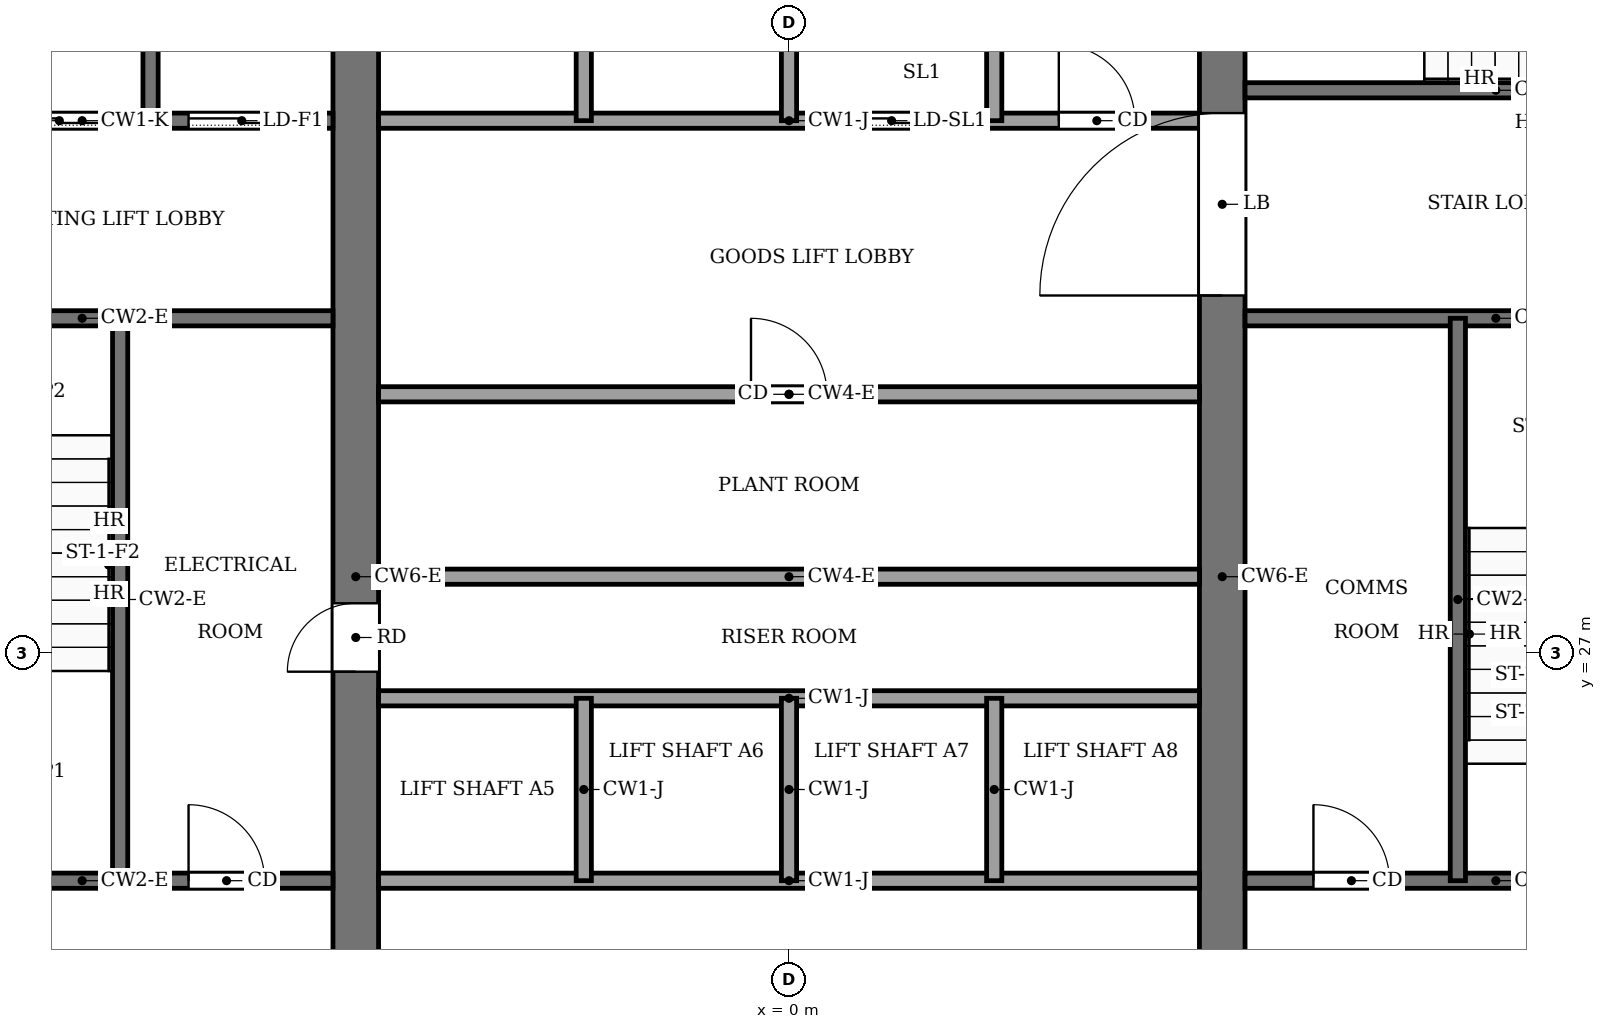
"""IFC4 building model, lengths in metres.
Left out: names, types, materials, properties, quantities, classifications, styles, units other than length and angle.
Written with IfcOpenShell. Run it as: python <this file> out.ifc"""

import sys

from ifc_helpers import new_model, si_unit, direction, frame, frame_2d, origin, place, context, subcontext, project, spatial, rectangle, extrude, element, fill, save


model = new_model("IFC4")
c1 = context("Model", 3, precision=1e-05, world=origin(), true_north=direction((0.0, 1.0)))
c2 = subcontext(c1, "Body", "Model", "MODEL_VIEW")
j1 = project(units=[si_unit("LENGTHUNIT", "METRE"), si_unit("PLANEANGLEUNIT", "RADIAN")], contexts=[c1])
p1 = place(None, origin())
s1 = spatial("IfcSite", under=j1, at=p1, CompositionType="ELEMENT")
p2 = place(p1, origin())
s2 = spatial("IfcBuilding", under=s1, at=p2, CompositionType="ELEMENT")
p3 = place(p2, frame((0.0, 0.0, 226.0)))
s3 = spatial("IfcBuildingStorey", under=s2, at=p3, CompositionType="ELEMENT", Elevation=226.0)
p4 = place(p3, frame((-5.7, 18.4, -0.25), z_axis=(0.0, 0.0, 1.0), x_axis=(0.0, 1.0, 0.0)))
e1 = element("IfcWall", 1, at=p4, inside=s3, PredefinedType="SHEAR", context=c2, shape_type="SweptSolid", body=[
    extrude(rectangle(XDim=19.2, YDim=0.6, at=frame_2d((9.6, 0.0))), origin(), (0.0, 0.0, 1.0), 7.12),
])
p5 = place(p4, frame((8.35, 0.0, 0.25)))
e2 = element("IfcOpeningElement", 2, at=p5, cuts=e1, PredefinedType="OPENING", context=c2, shape_type="SweptSolid", body=[
    extrude(rectangle(XDim=0.9, YDim=2.1, at=frame_2d((0.45, 1.05))), frame((0.0, 0.31, 0.0), z_axis=(0.0, -1.0, 0.0), x_axis=(1.0, 0.0, 0.0)), (0.0, 0.0, 1.0), 0.62),
])
p6 = place(p3, frame((5.7, 18.4, -0.25), z_axis=(0.0, 0.0, 1.0), x_axis=(0.0, 1.0, 0.0)))
e3 = element("IfcWall", 3, at=p6, inside=s3, PredefinedType="SHEAR", context=c2, shape_type="SweptSolid", body=[
    extrude(rectangle(XDim=19.2, YDim=0.6, at=frame_2d((9.6, 0.0))), origin(), (0.0, 0.0, 1.0), 7.12),
])
p7 = place(p6, frame((13.3, 0.0, 0.25)))
e4 = element("IfcOpeningElement", 4, at=p7, cuts=e3, PredefinedType="OPENING", context=c2, shape_type="SweptSolid", body=[
    extrude(rectangle(XDim=2.4, YDim=2.4, at=frame_2d((1.2, 1.2))), frame((0.0, 0.31, 0.0), z_axis=(0.0, -1.0, 0.0), x_axis=(1.0, 0.0, 0.0)), (0.0, 0.0, 1.0), 0.62),
])
p8 = place(p3, frame((-12.6, 24.0, 0.0), z_axis=(0.0, 0.0, 1.0), x_axis=(1.0, 0.0, 0.0)))
e5 = element("IfcWall", 5, at=p8, inside=s3, PredefinedType="PARTITIONING", context=c2, shape_type="SweptSolid", body=[
    extrude(rectangle(XDim=6.6, YDim=0.2, at=frame_2d((3.3, 0.0))), origin(), (0.0, 0.0, 1.0), 6.87),
])
p9 = place(p8, frame((4.7, 0.0, 0.0)))
e6 = element("IfcOpeningElement", 6, at=p9, cuts=e5, PredefinedType="OPENING", context=c2, shape_type="SweptSolid", body=[
    extrude(rectangle(XDim=1.0, YDim=2.1, at=frame_2d((0.5, 1.05))), frame((0.0, 0.11, 0.0), z_axis=(0.0, -1.0, 0.0), x_axis=(1.0, 0.0, 0.0)), (0.0, 0.0, 1.0), 0.22),
])
p10 = place(p3, frame((-5.4, 24.0, 0.0), z_axis=(0.0, 0.0, 1.0), x_axis=(1.0, 0.0, 0.0)))
e7 = element("IfcWall", 7, at=p10, inside=s3, PredefinedType="PARTITIONING", context=c2, shape_type="SweptSolid", body=[
    extrude(rectangle(XDim=10.8, YDim=0.2, at=frame_2d((5.4, 0.0))), origin(), (0.0, 0.0, 1.0), 6.87),
])
p11 = place(p3, frame((6.0, 24.0, 0.0), z_axis=(0.0, 0.0, 1.0), x_axis=(1.0, 0.0, 0.0)))
e8 = element("IfcWall", 8, at=p11, inside=s3, PredefinedType="PARTITIONING", context=c2, shape_type="SweptSolid", body=[
    extrude(rectangle(XDim=6.6, YDim=0.2, at=frame_2d((3.3, 0.0))), origin(), (0.0, 0.0, 1.0), 6.87),
])
p12 = place(p11, frame((0.9, 0.0, 0.0)))
e9 = element("IfcOpeningElement", 9, at=p12, cuts=e8, PredefinedType="OPENING", context=c2, shape_type="SweptSolid", body=[
    extrude(rectangle(XDim=1.0, YDim=2.1, at=frame_2d((0.5, 1.05))), frame((0.0, 0.11, 0.0), z_axis=(0.0, -1.0, 0.0), x_axis=(1.0, 0.0, 0.0)), (0.0, 0.0, 1.0), 0.22),
])
p13 = place(p11, frame((4.4, 0.0, 0.0)))
e10 = element("IfcOpeningElement", 10, at=p13, cuts=e8, PredefinedType="OPENING", context=c2, shape_type="SweptSolid", body=[
    extrude(rectangle(XDim=1.2, YDim=2.2, at=frame_2d((0.6, 1.1))), frame((0.0, 0.11, 0.0), z_axis=(0.0, -1.0, 0.0), x_axis=(1.0, 0.0, 0.0)), (0.0, 0.0, 1.0), 0.22),
])
for number, where, z_axis, x_axis in (
    (11, (-5.4, 26.4, 0.0), (0.0, 0.0, 1.0), (1.0, 0.0, 0.0)),
    (12, (-5.4, 28.0, 0.0), (0.0, 0.0, 1.0), (1.0, 0.0, 0.0)),
):
    element("IfcWall", number, at=place(p3, frame(where, z_axis=z_axis, x_axis=x_axis)), inside=s3, PredefinedType="PARTITIONING", context=c2, shape_type="SweptSolid", body=[
        extrude(rectangle(XDim=10.8, YDim=0.2, at=frame_2d((5.4, 0.0))), origin(), (0.0, 0.0, 1.0), 6.87),
    ])
p14 = place(p3, frame((-5.4, 30.4, 0.0), z_axis=(0.0, 0.0, 1.0), x_axis=(1.0, 0.0, 0.0)))
e13 = element("IfcWall", 13, at=p14, inside=s3, PredefinedType="PARTITIONING", context=c2, shape_type="SweptSolid", body=[
    extrude(rectangle(XDim=10.8, YDim=0.2, at=frame_2d((5.4, 0.0))), origin(), (0.0, 0.0, 1.0), 6.87),
])
p15 = place(p14, frame((4.9, 0.0, 0.0)))
e14 = element("IfcOpeningElement", 14, at=p15, cuts=e13, PredefinedType="OPENING", context=c2, shape_type="SweptSolid", body=[
    extrude(rectangle(XDim=1.0, YDim=2.1, at=frame_2d((0.5, 1.05))), frame((0.0, 0.11, 0.0), z_axis=(0.0, -1.0, 0.0), x_axis=(1.0, 0.0, 0.0)), (0.0, 0.0, 1.0), 0.22),
])
p16 = place(p3, frame((-12.6, 31.4, 0.0), z_axis=(0.0, 0.0, 1.0), x_axis=(1.0, 0.0, 0.0)))
e15 = element("IfcWall", 15, at=p16, inside=s3, PredefinedType="PARTITIONING", context=c2, shape_type="SweptSolid", body=[
    extrude(rectangle(XDim=6.6, YDim=0.2, at=frame_2d((3.3, 0.0))), origin(), (0.0, 0.0, 1.0), 6.87),
])
p17 = place(p16, frame((1.0, 0.0, 0.0)))
e16 = element("IfcOpeningElement", 16, at=p17, cuts=e15, PredefinedType="OPENING", context=c2, shape_type="SweptSolid", body=[
    extrude(rectangle(XDim=1.2, YDim=2.2, at=frame_2d((0.6, 1.1))), frame((0.0, 0.11, 0.0), z_axis=(0.0, -1.0, 0.0), x_axis=(1.0, 0.0, 0.0)), (0.0, 0.0, 1.0), 0.22),
])
p18 = place(p3, frame((6.0, 31.4, 0.0), z_axis=(0.0, 0.0, 1.0), x_axis=(1.0, 0.0, 0.0)))
e17 = element("IfcWall", 17, at=p18, inside=s3, PredefinedType="PARTITIONING", context=c2, shape_type="SweptSolid", body=[
    extrude(rectangle(XDim=6.6, YDim=0.2, at=frame_2d((3.3, 0.0))), origin(), (0.0, 0.0, 1.0), 6.87),
])
p19 = place(p3, frame((-12.6, 34.0, 0.0), z_axis=(0.0, 0.0, 1.0), x_axis=(1.0, 0.0, 0.0)))
e18 = element("IfcWall", 18, at=p19, inside=s3, PredefinedType="PARTITIONING", context=c2, shape_type="SweptSolid", body=[
    extrude(rectangle(XDim=6.6, YDim=0.2, at=frame_2d((3.3, 0.0))), origin(), (0.0, 0.0, 1.0), 6.87),
])
p20 = place(p19, frame((4.7, 0.0, 0.0)))
e19 = element("IfcOpeningElement", 19, at=p20, cuts=e18, PredefinedType="OPENING", context=c2, shape_type="SweptSolid", body=[
    extrude(rectangle(XDim=1.4, YDim=2.2, at=frame_2d((0.7, 1.1))), frame((0.0, 0.11, 0.0), z_axis=(0.0, -1.0, 0.0), x_axis=(1.0, 0.0, 0.0)), (0.0, 0.0, 1.0), 0.22),
])
p21 = place(p19, frame((2.3, 0.0, 0.0)))
e20 = element("IfcOpeningElement", 20, at=p21, cuts=e18, PredefinedType="OPENING", context=c2, shape_type="SweptSolid", body=[
    extrude(rectangle(XDim=1.4, YDim=2.2, at=frame_2d((0.7, 1.1))), frame((0.0, 0.11, 0.0), z_axis=(0.0, -1.0, 0.0), x_axis=(1.0, 0.0, 0.0)), (0.0, 0.0, 1.0), 0.22),
])
p22 = place(p19, frame((0.45, 0.0, 0.0)))
e21 = element("IfcOpeningElement", 21, at=p22, cuts=e18, PredefinedType="OPENING", context=c2, shape_type="SweptSolid", body=[
    extrude(rectangle(XDim=0.9, YDim=2.1, at=frame_2d((0.45, 1.05))), frame((0.0, 0.11, 0.0), z_axis=(0.0, -1.0, 0.0), x_axis=(1.0, 0.0, 0.0)), (0.0, 0.0, 1.0), 0.22),
])
p23 = place(p3, frame((-5.4, 34.0, 0.0), z_axis=(0.0, 0.0, 1.0), x_axis=(1.0, 0.0, 0.0)))
e22 = element("IfcWall", 22, at=p23, inside=s3, PredefinedType="PARTITIONING", context=c2, shape_type="SweptSolid", body=[
    extrude(rectangle(XDim=10.8, YDim=0.2, at=frame_2d((5.4, 0.0))), origin(), (0.0, 0.0, 1.0), 6.87),
])
p24 = place(p23, frame((6.15, 0.0, 0.0)))
e23 = element("IfcOpeningElement", 23, at=p24, cuts=e22, PredefinedType="OPENING", context=c2, shape_type="SweptSolid", body=[
    extrude(rectangle(XDim=1.2, YDim=2.2, at=frame_2d((0.6, 1.1))), frame((0.0, 0.11, 0.0), z_axis=(0.0, -1.0, 0.0), x_axis=(1.0, 0.0, 0.0)), (0.0, 0.0, 1.0), 0.22),
])
p25 = place(p23, frame((8.95, 0.0, 0.0)))
e24 = element("IfcOpeningElement", 24, at=p25, cuts=e22, PredefinedType="OPENING", context=c2, shape_type="SweptSolid", body=[
    extrude(rectangle(XDim=1.0, YDim=2.1, at=frame_2d((0.5, 1.05))), frame((0.0, 0.11, 0.0), z_axis=(0.0, -1.0, 0.0), x_axis=(1.0, 0.0, 0.0)), (0.0, 0.0, 1.0), 0.22),
])
p26 = place(p3, frame((6.0, 34.4, 0.0), z_axis=(0.0, 0.0, 1.0), x_axis=(1.0, 0.0, 0.0)))
e25 = element("IfcWall", 25, at=p26, inside=s3, PredefinedType="PARTITIONING", context=c2, shape_type="SweptSolid", body=[
    extrude(rectangle(XDim=6.6, YDim=0.2, at=frame_2d((3.3, 0.0))), origin(), (0.0, 0.0, 1.0), 6.87),
])
p27 = place(p26, frame((4.8, 0.0, 0.0)))
e26 = element("IfcOpeningElement", 26, at=p27, cuts=e25, PredefinedType="OPENING", context=c2, shape_type="SweptSolid", body=[
    extrude(rectangle(XDim=1.2, YDim=2.2, at=frame_2d((0.6, 1.1))), frame((0.0, 0.11, 0.0), z_axis=(0.0, -1.0, 0.0), x_axis=(1.0, 0.0, 0.0)), (0.0, 0.0, 1.0), 0.22),
])
p28 = place(p3, frame((-8.8, 24.0, 0.0), z_axis=(0.0, 0.0, 1.0), x_axis=(0.0, 1.0, 0.0)))
e27 = element("IfcWall", 27, at=p28, inside=s3, PredefinedType="PARTITIONING", context=c2, shape_type="SweptSolid", body=[
    extrude(rectangle(XDim=7.4, YDim=0.2, at=frame_2d((3.7, 0.0))), origin(), (0.0, 0.0, 1.0), 6.87),
])
p29 = place(p3, frame((-8.4, 34.0, 0.0), z_axis=(0.0, 0.0, 1.0), x_axis=(0.0, 1.0, 0.0)))
e28 = element("IfcWall", 28, at=p29, inside=s3, PredefinedType="PARTITIONING", context=c2, shape_type="SweptSolid", body=[
    extrude(rectangle(XDim=3.6, YDim=0.2, at=frame_2d((1.8, 0.0))), origin(), (0.0, 0.0, 1.0), 6.87),
])
p30 = place(p3, frame((-2.7, 24.0, 0.0), z_axis=(0.0, 0.0, 1.0), x_axis=(0.0, 1.0, 0.0)))
e29 = element("IfcWall", 29, at=p30, inside=s3, PredefinedType="PARTITIONING", context=c2, shape_type="SweptSolid", body=[
    extrude(rectangle(XDim=2.4, YDim=0.2, at=frame_2d((1.2, 0.0))), origin(), (0.0, 0.0, 1.0), 6.87),
])
p31 = place(p3, frame((-2.7, 34.0, 0.0), z_axis=(0.0, 0.0, 1.0), x_axis=(0.0, 1.0, 0.0)))
e30 = element("IfcWall", 30, at=p31, inside=s3, PredefinedType="PARTITIONING", context=c2, shape_type="SweptSolid", body=[
    extrude(rectangle(XDim=3.6, YDim=0.2, at=frame_2d((1.8, 0.0))), origin(), (0.0, 0.0, 1.0), 6.87),
])
p32 = place(p3, frame((0.0, 24.0, 0.0), z_axis=(0.0, 0.0, 1.0), x_axis=(0.0, 1.0, 0.0)))
e31 = element("IfcWall", 31, at=p32, inside=s3, PredefinedType="PARTITIONING", context=c2, shape_type="SweptSolid", body=[
    extrude(rectangle(XDim=2.4, YDim=0.2, at=frame_2d((1.2, 0.0))), origin(), (0.0, 0.0, 1.0), 6.87),
])
p33 = place(p3, frame((0.0, 34.0, 0.0), z_axis=(0.0, 0.0, 1.0), x_axis=(0.0, 1.0, 0.0)))
e32 = element("IfcWall", 32, at=p33, inside=s3, PredefinedType="PARTITIONING", context=c2, shape_type="SweptSolid", body=[
    extrude(rectangle(XDim=3.6, YDim=0.2, at=frame_2d((1.8, 0.0))), origin(), (0.0, 0.0, 1.0), 6.87),
])
p34 = place(p3, frame((2.7, 24.0, 0.0), z_axis=(0.0, 0.0, 1.0), x_axis=(0.0, 1.0, 0.0)))
e33 = element("IfcWall", 33, at=p34, inside=s3, PredefinedType="PARTITIONING", context=c2, shape_type="SweptSolid", body=[
    extrude(rectangle(XDim=2.4, YDim=0.2, at=frame_2d((1.2, 0.0))), origin(), (0.0, 0.0, 1.0), 6.87),
])
p35 = place(p3, frame((2.7, 34.0, 0.0), z_axis=(0.0, 0.0, 1.0), x_axis=(0.0, 1.0, 0.0)))
e34 = element("IfcWall", 34, at=p35, inside=s3, PredefinedType="PARTITIONING", context=c2, shape_type="SweptSolid", body=[
    extrude(rectangle(XDim=3.6, YDim=0.2, at=frame_2d((1.8, 0.0))), origin(), (0.0, 0.0, 1.0), 6.87),
])
p36 = place(p3, frame((8.8, 24.0, 0.0), z_axis=(0.0, 0.0, 1.0), x_axis=(0.0, 1.0, 0.0)))
e35 = element("IfcWall", 35, at=p36, inside=s3, PredefinedType="PARTITIONING", context=c2, shape_type="SweptSolid", body=[
    extrude(rectangle(XDim=7.4, YDim=0.2, at=frame_2d((3.7, 0.0))), origin(), (0.0, 0.0, 1.0), 6.87),
])
p37 = place(p24, origin())
e36 = element("IfcDoor", 36, at=p37, inside=s3, OperationType="SLIDING_TO_LEFT", PredefinedType="DOOR", context=c2, shape_type="SweptSolid", body=[
    extrude(rectangle(XDim=1.2, YDim=2.2, at=frame_2d((0.6, 1.1))), frame((0.0, 0.025, 0.0), z_axis=(0.0, -1.0, 0.0), x_axis=(1.0, 0.0, 0.0)), (0.0, 0.0, 1.0), 0.05),
])
fill(e23, e36)
p38 = place(p20, origin())
e37 = element("IfcDoor", 37, at=p38, inside=s3, OperationType="SLIDING_TO_LEFT", PredefinedType="DOOR", context=c2, shape_type="SweptSolid", body=[
    extrude(rectangle(XDim=1.4, YDim=2.2, at=frame_2d((0.7, 1.1))), frame((0.0, 0.025, 0.0), z_axis=(0.0, -1.0, 0.0), x_axis=(1.0, 0.0, 0.0)), (0.0, 0.0, 1.0), 0.05),
])
fill(e19, e37)
p39 = place(p21, origin())
e38 = element("IfcDoor", 38, at=p39, inside=s3, OperationType="SLIDING_TO_LEFT", PredefinedType="DOOR", context=c2, shape_type="SweptSolid", body=[
    extrude(rectangle(XDim=1.4, YDim=2.2, at=frame_2d((0.7, 1.1))), frame((0.0, 0.025, 0.0), z_axis=(0.0, -1.0, 0.0), x_axis=(1.0, 0.0, 0.0)), (0.0, 0.0, 1.0), 0.05),
])
fill(e20, e38)
p40 = place(p15, origin())
e39 = element("IfcDoor", 39, at=p40, inside=s3, OperationType="SINGLE_SWING_RIGHT", PredefinedType="DOOR", context=c2, shape_type="SweptSolid", body=[
    extrude(rectangle(XDim=1.0, YDim=2.1, at=frame_2d((0.5, 1.05))), frame((0.0, 0.025, 0.0), z_axis=(0.0, -1.0, 0.0), x_axis=(1.0, 0.0, 0.0)), (0.0, 0.0, 1.0), 0.05),
])
fill(e14, e39)
p41 = place(p9, origin())
e40 = element("IfcDoor", 40, at=p41, inside=s3, OperationType="SINGLE_SWING_LEFT", PredefinedType="DOOR", context=c2, shape_type="SweptSolid", body=[
    extrude(rectangle(XDim=1.0, YDim=2.1, at=frame_2d((0.5, 1.05))), frame((0.0, 0.025, 0.0), z_axis=(0.0, -1.0, 0.0), x_axis=(1.0, 0.0, 0.0)), (0.0, 0.0, 1.0), 0.05),
])
fill(e6, e40)
p42 = place(p12, origin())
e41 = element("IfcDoor", 41, at=p42, inside=s3, OperationType="SINGLE_SWING_RIGHT", PredefinedType="DOOR", context=c2, shape_type="SweptSolid", body=[
    extrude(rectangle(XDim=1.0, YDim=2.1, at=frame_2d((0.5, 1.05))), frame((0.0, 0.025, 0.0), z_axis=(0.0, -1.0, 0.0), x_axis=(1.0, 0.0, 0.0)), (0.0, 0.0, 1.0), 0.05),
])
fill(e9, e41)
p43 = place(p25, origin())
e42 = element("IfcDoor", 42, at=p43, inside=s3, OperationType="SINGLE_SWING_LEFT", PredefinedType="DOOR", context=c2, shape_type="SweptSolid", body=[
    extrude(rectangle(XDim=1.0, YDim=2.1, at=frame_2d((0.5, 1.05))), frame((0.0, 0.025, 0.0), z_axis=(0.0, -1.0, 0.0), x_axis=(1.0, 0.0, 0.0)), (0.0, 0.0, 1.0), 0.05),
])
fill(e24, e42)
p44 = place(p5, origin())
e43 = element("IfcDoor", 43, at=p44, inside=s3, OperationType="SINGLE_SWING_LEFT", PredefinedType="DOOR", context=c2, shape_type="SweptSolid", body=[
    extrude(rectangle(XDim=0.9, YDim=2.1, at=frame_2d((0.45, 1.05))), frame((0.0, 0.025, 0.0), z_axis=(0.0, -1.0, 0.0), x_axis=(1.0, 0.0, 0.0)), (0.0, 0.0, 1.0), 0.05),
])
fill(e2, e43)
p45 = place(p7, origin())
e44 = element("IfcDoor", 44, at=p45, inside=s3, OperationType="DOUBLE_DOOR_SINGLE_SWING", PredefinedType="DOOR", context=c2, shape_type="SweptSolid", body=[
    extrude(rectangle(XDim=2.4, YDim=2.4, at=frame_2d((1.2, 1.2))), frame((0.0, 0.025, 0.0), z_axis=(0.0, -1.0, 0.0), x_axis=(1.0, 0.0, 0.0)), (0.0, 0.0, 1.0), 0.05),
])
fill(e4, e44)
save(model, sys.argv[1])
